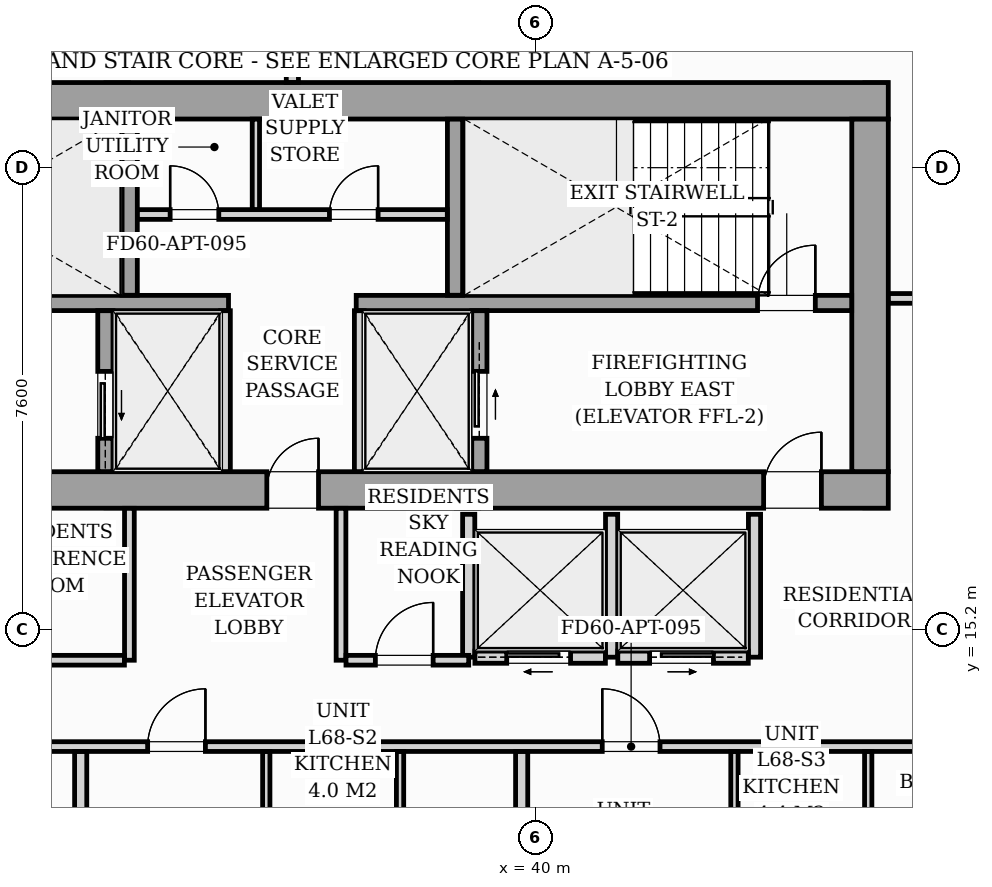
"""IFC4 building model, lengths in metres.
Left out: names, types, materials, properties, quantities, classifications, styles, units other than length and angle.
Written with IfcOpenShell. Run it as: python <this file> out.ifc"""

import sys

from ifc_helpers import new_model, si_unit, direction, frame, frame_2d, origin, origin_2d, place, context, subcontext, project, spatial, rectangle, i_section, extrude, source, transform, mapped, element, fill, save


model = new_model("IFC4")
c1 = context("Model", 3, precision=1e-05, world=origin(), true_north=direction((0.0, 1.0)))
c2 = subcontext(c1, "Body", "Model", "MODEL_VIEW")
j1 = project(units=[si_unit("LENGTHUNIT", "METRE"), si_unit("PLANEANGLEUNIT", "RADIAN")], contexts=[c1])
p1 = place(None, origin())
s1 = spatial("IfcSite", under=j1, at=p1, CompositionType="ELEMENT")
p2 = place(p1, origin())
s2 = spatial("IfcBuilding", under=s1, at=p2, CompositionType="ELEMENT")
p3 = place(p2, frame((0.0, 0.0, 236.4)))
s3 = spatial("IfcBuildingStorey", under=s2, at=p3, CompositionType="ELEMENT", Elevation=236.4)
m1 = source(origin(), c2, "Body", "SweptSolid", [
    extrude(i_section(OverallWidth=0.409, OverallDepth=0.425, WebThickness=0.033, FlangeThickness=0.052, FilletRadius=0.018, at=origin_2d()), origin(), (0.0, 0.0, 1.0), 3.296),
])
for number, where, z_axis, x_axis in (
    (1, (33.12, 17.4, 0.002), (0.0, 0.0, 1.0), (1.0, 0.0, 0.0)),
    (2, (38.88, 17.4, 0.002), (0.0, 0.0, 1.0), (1.0, 0.0, 0.0)),
    (3, (45.6, 17.4, 0.002), (0.0, 0.0, 1.0), (1.0, 0.0, 0.0)),
    (4, (33.12, 24.0, 0.002), (0.0, 0.0, 1.0), (1.0, 0.0, 0.0)),
    (5, (38.88, 24.0, 0.002), (0.0, 0.0, 1.0), (1.0, 0.0, 0.0)),
    (6, (45.6, 24.0, 0.002), (0.0, 0.0, 1.0), (1.0, 0.0, 0.0)),
):
    element("IfcColumn", number, at=place(p3, frame(where, z_axis=z_axis, x_axis=x_axis)), inside=s3, PredefinedType="PILASTER", context=c2, shape_type="MappedRepresentation", body=[
        mapped(m1, transform((0.0, 0.0, 0.0), scale=1.0)),
    ])
p4 = place(p3, frame((26.2, 17.5, 0.0), z_axis=(0.0, 0.0, 1.0), x_axis=(1.0, 0.0, 0.0)))
e7 = element("IfcWall", 7, at=p4, inside=s3, PredefinedType="SHEAR", context=c2, shape_type="SweptSolid", body=[
    extrude(rectangle(XDim=19.6, YDim=0.6, at=frame_2d((9.8, 0.0))), origin(), (0.0, 0.0, 1.0), 3.3),
])
p5 = place(p4, frame((0.95, 0.0, 0.0)))
e8 = element("IfcOpeningElement", 8, at=p5, cuts=e7, PredefinedType="OPENING", context=c2, shape_type="SweptSolid", body=[
    extrude(rectangle(XDim=0.95, YDim=2.06, at=frame_2d((0.475, 1.03))), frame((0.0, 0.31, 0.0), z_axis=(0.0, -1.0, 0.0), x_axis=(1.0, 0.0, 0.0)), (0.0, 0.0, 1.0), 0.62),
])
p6 = place(p4, frame((9.38, 0.0, 0.0)))
e9 = element("IfcOpeningElement", 9, at=p6, cuts=e7, PredefinedType="OPENING", context=c2, shape_type="SweptSolid", body=[
    extrude(rectangle(XDim=0.85, YDim=2.0, at=frame_2d((0.425, 1.0))), frame((0.0, 0.31, 0.0), z_axis=(0.0, -1.0, 0.0), x_axis=(1.0, 0.0, 0.0)), (0.0, 0.0, 1.0), 0.62),
])
p7 = place(p4, frame((17.55, 0.0, 0.0)))
e10 = element("IfcOpeningElement", 10, at=p7, cuts=e7, PredefinedType="OPENING", context=c2, shape_type="SweptSolid", body=[
    extrude(rectangle(XDim=0.95, YDim=2.06, at=frame_2d((0.475, 1.03))), frame((0.0, 0.31, 0.0), z_axis=(0.0, -1.0, 0.0), x_axis=(1.0, 0.0, 0.0)), (0.0, 0.0, 1.0), 0.62),
])
p8 = place(p3, frame((26.2, 23.9, 0.0), z_axis=(0.0, 0.0, 1.0), x_axis=(1.0, 0.0, 0.0)))
e11 = element("IfcWall", 11, at=p8, inside=s3, PredefinedType="SHEAR", context=c2, shape_type="SweptSolid", body=[
    extrude(rectangle(XDim=19.6, YDim=0.6, at=frame_2d((9.8, 0.0))), origin(), (0.0, 0.0, 1.0), 3.3),
])
p9 = place(p3, frame((45.5, 17.802, 0.0), z_axis=(0.0, 0.0, 1.0), x_axis=(0.0, 1.0, 0.0)))
e12 = element("IfcWall", 12, at=p9, inside=s3, PredefinedType="SHEAR", context=c2, shape_type="SweptSolid", body=[
    extrude(rectangle(XDim=5.796, YDim=0.6, at=frame_2d((2.898, 0.0))), origin(), (0.0, 0.0, 1.0), 3.3),
])
p10 = place(p3, frame((26.802, 20.575, 0.0), z_axis=(0.0, 0.0, 1.0), x_axis=(1.0, 0.0, 0.0)))
e13 = element("IfcWall", 13, at=p10, inside=s3, PredefinedType="SOLIDWALL", context=c2, shape_type="SweptSolid", body=[
    extrude(rectangle(XDim=8.148, YDim=0.25, at=frame_2d((4.074, 0.0))), origin(), (0.0, 0.0, 1.0), 3.3),
])
p11 = place(p10, frame((0.298, 0.0, 0.0)))
e14 = element("IfcOpeningElement", 14, at=p11, cuts=e13, PredefinedType="OPENING", context=c2, shape_type="SweptSolid", body=[
    extrude(rectangle(XDim=0.95, YDim=2.06, at=frame_2d((0.475, 1.03))), frame((0.0, 0.135, 0.0), z_axis=(0.0, -1.0, 0.0), x_axis=(1.0, 0.0, 0.0)), (0.0, 0.0, 1.0), 0.27),
])
p12 = place(p3, frame((37.05, 20.575, 0.0), z_axis=(0.0, 0.0, 1.0), x_axis=(1.0, 0.0, 0.0)))
e15 = element("IfcWall", 15, at=p12, inside=s3, PredefinedType="SOLIDWALL", context=c2, shape_type="SweptSolid", body=[
    extrude(rectangle(XDim=8.148, YDim=0.25, at=frame_2d((4.074, 0.0))), origin(), (0.0, 0.0, 1.0), 3.3),
])
p13 = place(p12, frame((6.6, 0.0, 0.0)))
e16 = element("IfcOpeningElement", 16, at=p13, cuts=e15, PredefinedType="OPENING", context=c2, shape_type="SweptSolid", body=[
    extrude(rectangle(XDim=0.95, YDim=2.06, at=frame_2d((0.475, 1.03))), frame((0.0, 0.135, 0.0), z_axis=(0.0, -1.0, 0.0), x_axis=(1.0, 0.0, 0.0)), (0.0, 0.0, 1.0), 0.27),
])
for number, where, z_axis, x_axis in (
    (17, (33.325, 20.702, 0.0), (0.0, 0.0, 1.0), (0.0, 1.0, 0.0)),
    (18, (38.675, 20.702, 0.0), (0.0, 0.0, 1.0), (0.0, 1.0, 0.0)),
):
    element("IfcWall", number, at=place(p3, frame(where, z_axis=z_axis, x_axis=x_axis)), inside=s3, PredefinedType="SOLIDWALL", context=c2, shape_type="SweptSolid", body=[
        extrude(rectangle(XDim=2.896, YDim=0.25, at=frame_2d((1.448, 0.0))), origin(), (0.0, 0.0, 1.0), 3.3),
    ])
p14 = place(p3, frame((32.925, 17.802, 0.0), z_axis=(0.0, 0.0, 1.0), x_axis=(0.0, 1.0, 0.0)))
e19 = element("IfcWall", 19, at=p14, inside=s3, PredefinedType="SOLIDWALL", context=c2, shape_type="SweptSolid", body=[
    extrude(rectangle(XDim=2.646, YDim=0.25, at=frame_2d((1.323, 0.0))), origin(), (0.0, 0.0, 1.0), 3.3),
])
p15 = place(p14, frame((0.548, 0.0, 0.0)))
e20 = element("IfcOpeningElement", 20, at=p15, cuts=e19, PredefinedType="OPENING", context=c2, shape_type="SweptSolid", body=[
    extrude(rectangle(XDim=1.1, YDim=2.08, at=frame_2d((0.55, 1.04))), frame((0.0, 0.135, 0.0), z_axis=(0.0, -1.0, 0.0), x_axis=(1.0, 0.0, 0.0)), (0.0, 0.0, 1.0), 0.27),
])
for number, where, z_axis, x_axis in (
    (21, (34.9, 17.802, 0.0), (0.0, 0.0, 1.0), (0.0, 1.0, 0.0)),
    (22, (37.1, 17.802, 0.0), (0.0, 0.0, 1.0), (0.0, 1.0, 0.0)),
):
    element("IfcWall", number, at=place(p3, frame(where, z_axis=z_axis, x_axis=x_axis)), inside=s3, PredefinedType="PARTITIONING", context=c2, shape_type="SweptSolid", body=[
        extrude(rectangle(XDim=2.646, YDim=0.16, at=frame_2d((1.323, 0.0))), origin(), (0.0, 0.0, 1.0), 3.04),
    ])
p16 = place(p3, frame((39.075, 17.802, 0.0), z_axis=(0.0, 0.0, 1.0), x_axis=(0.0, 1.0, 0.0)))
e23 = element("IfcWall", 23, at=p16, inside=s3, PredefinedType="SOLIDWALL", context=c2, shape_type="SweptSolid", body=[
    extrude(rectangle(XDim=2.646, YDim=0.25, at=frame_2d((1.323, 0.0))), origin(), (0.0, 0.0, 1.0), 3.3),
])
p17 = place(p16, frame((0.548, 0.0, 0.0)))
e24 = element("IfcOpeningElement", 24, at=p17, cuts=e23, PredefinedType="OPENING", context=c2, shape_type="SweptSolid", body=[
    extrude(rectangle(XDim=1.1, YDim=2.08, at=frame_2d((0.55, 1.04))), frame((0.0, 0.135, 0.0), z_axis=(0.0, -1.0, 0.0), x_axis=(1.0, 0.0, 0.0)), (0.0, 0.0, 1.0), 0.27),
])
p18 = place(p3, frame((33.452, 22.03, 0.0), z_axis=(0.0, 0.0, 1.0), x_axis=(1.0, 0.0, 0.0)))
e25 = element("IfcWall", 25, at=p18, inside=s3, PredefinedType="PARTITIONING", context=c2, shape_type="SweptSolid", body=[
    extrude(rectangle(XDim=5.096, YDim=0.16, at=frame_2d((2.548, 0.0))), origin(), (0.0, 0.0, 1.0), 3.04),
])
p19 = place(p18, frame((0.538, 0.0, 0.0)))
e26 = element("IfcOpeningElement", 26, at=p19, cuts=e25, PredefinedType="OPENING", context=c2, shape_type="SweptSolid", body=[
    extrude(rectangle(XDim=0.8, YDim=2.05, at=frame_2d((0.4, 1.025))), frame((0.0, 0.09, 0.0), z_axis=(0.0, -1.0, 0.0), x_axis=(1.0, 0.0, 0.0)), (0.0, 0.0, 1.0), 0.18),
])
p20 = place(p18, frame((3.158, 0.0, 0.0)))
e27 = element("IfcOpeningElement", 27, at=p20, cuts=e25, PredefinedType="OPENING", context=c2, shape_type="SweptSolid", body=[
    extrude(rectangle(XDim=0.8, YDim=2.05, at=frame_2d((0.4, 1.025))), frame((0.0, 0.09, 0.0), z_axis=(0.0, -1.0, 0.0), x_axis=(1.0, 0.0, 0.0)), (0.0, 0.0, 1.0), 0.18),
])
p21 = place(p3, frame((35.4, 22.112, 0.0), z_axis=(0.0, 0.0, 1.0), x_axis=(0.0, 1.0, 0.0)))
e28 = element("IfcWall", 28, at=p21, inside=s3, PredefinedType="PARTITIONING", context=c2, shape_type="SweptSolid", body=[
    extrude(rectangle(XDim=1.486, YDim=0.12, at=frame_2d((0.743, 0.0))), origin(), (0.0, 0.0, 1.0), 3.04),
])
for number, where, z_axis, x_axis in (
    (29, (38.9, 14.75, 0.0), (0.0, 0.0, 1.0), (0.0, 1.0, 0.0)),
    (30, (41.25, 14.75, 0.0), (0.0, 0.0, 1.0), (0.0, 1.0, 0.0)),
    (31, (43.6, 14.75, 0.0), (0.0, 0.0, 1.0), (0.0, 1.0, 0.0)),
):
    element("IfcWall", number, at=place(p3, frame(where, z_axis=z_axis, x_axis=x_axis)), inside=s3, PredefinedType="PARTITIONING", context=c2, shape_type="SweptSolid", body=[
        extrude(rectangle(XDim=2.35, YDim=0.2, at=frame_2d((1.175, 0.0))), origin(), (0.0, 0.0, 1.0), 3.04),
    ])
p22 = place(p3, frame((39.002, 14.75, 0.0), z_axis=(0.0, 0.0, 1.0), x_axis=(1.0, 0.0, 0.0)))
e32 = element("IfcWall", 32, at=p22, inside=s3, PredefinedType="PARTITIONING", context=c2, shape_type="SweptSolid", body=[
    extrude(rectangle(XDim=2.146, YDim=0.2, at=frame_2d((1.073, 0.0))), origin(), (0.0, 0.0, 1.0), 3.04),
])
p23 = place(p22, frame((0.523, 0.0, 0.0)))
e33 = element("IfcOpeningElement", 33, at=p23, cuts=e32, PredefinedType="OPENING", context=c2, shape_type="SweptSolid", body=[
    extrude(rectangle(XDim=1.05, YDim=2.08, at=frame_2d((0.525, 1.04))), frame((0.0, 0.11, 0.0), z_axis=(0.0, -1.0, 0.0), x_axis=(1.0, 0.0, 0.0)), (0.0, 0.0, 1.0), 0.22),
])
p24 = place(p3, frame((41.352, 14.75, 0.0), z_axis=(0.0, 0.0, 1.0), x_axis=(1.0, 0.0, 0.0)))
e34 = element("IfcWall", 34, at=p24, inside=s3, PredefinedType="PARTITIONING", context=c2, shape_type="SweptSolid", body=[
    extrude(rectangle(XDim=2.146, YDim=0.2, at=frame_2d((1.073, 0.0))), origin(), (0.0, 0.0, 1.0), 3.04),
])
p25 = place(p24, frame((0.523, 0.0, 0.0)))
e35 = element("IfcOpeningElement", 35, at=p25, cuts=e34, PredefinedType="OPENING", context=c2, shape_type="SweptSolid", body=[
    extrude(rectangle(XDim=1.05, YDim=2.08, at=frame_2d((0.525, 1.04))), frame((0.0, 0.11, 0.0), z_axis=(0.0, -1.0, 0.0), x_axis=(1.0, 0.0, 0.0)), (0.0, 0.0, 1.0), 0.22),
])
p26 = place(p3, frame((26.12, 13.28, 0.0), z_axis=(0.0, 0.0, 1.0), x_axis=(1.0, 0.0, 0.0)))
e36 = element("IfcWall", 36, at=p26, inside=s3, PredefinedType="PARTITIONING", context=c2, shape_type="SweptSolid", body=[
    extrude(rectangle(XDim=21.33, YDim=0.16, at=frame_2d((10.665, 0.0))), origin(), (0.0, 0.0, 1.0), 2.597),
])
p27 = place(p26, frame((4.704, 0.0, 0.0)))
e37 = element("IfcOpeningElement", 37, at=p27, cuts=e36, PredefinedType="OPENING", context=c2, shape_type="SweptSolid", body=[
    extrude(rectangle(XDim=0.95, YDim=2.06, at=frame_2d((0.475, 1.03))), frame((0.0, 0.09, 0.0), z_axis=(0.0, -1.0, 0.0), x_axis=(1.0, 0.0, 0.0)), (0.0, 0.0, 1.0), 0.18),
])
p28 = place(p26, frame((7.5, 0.0, 0.0)))
e38 = element("IfcOpeningElement", 38, at=p28, cuts=e36, PredefinedType="OPENING", context=c2, shape_type="SweptSolid", body=[
    extrude(rectangle(XDim=0.95, YDim=2.06, at=frame_2d((0.475, 1.03))), frame((0.0, 0.09, 0.0), z_axis=(0.0, -1.0, 0.0), x_axis=(1.0, 0.0, 0.0)), (0.0, 0.0, 1.0), 0.18),
])
p29 = place(p26, frame((14.976, 0.0, 0.0)))
e39 = element("IfcOpeningElement", 39, at=p29, cuts=e36, PredefinedType="OPENING", context=c2, shape_type="SweptSolid", body=[
    extrude(rectangle(XDim=0.95, YDim=2.06, at=frame_2d((0.475, 1.03))), frame((0.0, 0.09, 0.0), z_axis=(0.0, -1.0, 0.0), x_axis=(1.0, 0.0, 0.0)), (0.0, 0.0, 1.0), 0.18),
])
p30 = place(p3, frame((36.0, 24.202, 0.0), z_axis=(0.0, 0.0, 1.0), x_axis=(0.0, 1.0, 0.0)))
e40 = element("IfcWall", 40, at=p30, inside=s3, PredefinedType="PARTITIONING", context=c2, shape_type="SweptSolid", body=[
    extrude(rectangle(XDim=2.363, YDim=0.2, at=frame_2d((1.182, 0.0))), origin(), (0.0, 0.0, 1.0), 3.04),
])
p31 = place(p3, frame((45.802, 20.65, 0.0), z_axis=(0.0, 0.0, 1.0), x_axis=(1.0, 0.0, 0.0)))
e41 = element("IfcWall", 41, at=p31, inside=s3, PredefinedType="PARTITIONING", context=c2, shape_type="SweptSolid", body=[
    extrude(rectangle(XDim=1.566, YDim=0.16, at=frame_2d((0.783, 0.0))), origin(), (0.0, 0.0, 1.0), 3.04),
])
p32 = place(p3, frame((32.519, 9.169, 0.0), z_axis=(0.0, 0.0, 1.0), x_axis=(0.0, 1.0, 0.0)))
e42 = element("IfcWall", 42, at=p32, inside=s3, PredefinedType="PARTITIONING", context=c2, shape_type="SweptSolid", body=[
    extrude(rectangle(XDim=4.029, YDim=0.2, at=frame_2d((2.014, 0.0))), origin(), (0.0, 0.0, 1.0), 2.4),
])
for number, where, z_axis, x_axis in (
    (43, (35.571, 11.273, 0.0), (0.0, 0.0, 1.0), (0.0, 1.0, 0.0)),
    (44, (37.771, 11.273, 0.0), (0.0, 0.0, 1.0), (0.0, 1.0, 0.0)),
):
    element("IfcWall", number, at=place(p3, frame(where, z_axis=z_axis, x_axis=x_axis)), inside=s3, PredefinedType="PARTITIONING", context=c2, shape_type="SweptSolid", body=[
        extrude(rectangle(XDim=1.925, YDim=0.12, at=frame_2d((0.962, 0.0))), origin(), (0.0, 0.0, 1.0), 3.04),
    ])
p33 = place(p3, frame((39.771, 11.273, 0.0), z_axis=(0.0, 0.0, 1.0), x_axis=(0.0, 1.0, 0.0)))
e45 = element("IfcWall", 45, at=p33, inside=s3, PredefinedType="PARTITIONING", context=c2, shape_type="SweptSolid", body=[
    extrude(rectangle(XDim=1.925, YDim=0.2, at=frame_2d((0.962, 0.0))), origin(), (0.0, 0.0, 1.0), 3.04),
])
for number, where, z_axis, x_axis in (
    (46, (43.27, 11.092, 0.0), (0.0, 0.0, 1.0), (0.0, 1.0, 0.0)),
    (47, (45.47, 11.092, 0.0), (0.0, 0.0, 1.0), (0.0, 1.0, 0.0)),
):
    element("IfcWall", number, at=place(p3, frame(where, z_axis=z_axis, x_axis=x_axis)), inside=s3, PredefinedType="PARTITIONING", context=c2, shape_type="SweptSolid", body=[
        extrude(rectangle(XDim=2.106, YDim=0.12, at=frame_2d((1.053, 0.0))), origin(), (0.0, 0.0, 1.0), 3.04),
    ])
p34 = place(p3, frame((33.32, 14.7, 0.0), z_axis=(0.0, 0.0, 1.0), x_axis=(0.0, 1.0, 0.0)))
e48 = element("IfcWall", 48, at=p34, inside=s3, PredefinedType="PARTITIONING", context=c2, shape_type="SweptSolid", body=[
    extrude(rectangle(XDim=2.498, YDim=0.16, at=frame_2d((1.249, 0.0))), origin(), (0.0, 0.0, 1.0), 3.04),
])
p35 = place(p3, frame((28.442, 14.7, 0.0), z_axis=(0.0, 0.0, 1.0), x_axis=(1.0, 0.0, 0.0)))
e49 = element("IfcWall", 49, at=p35, inside=s3, PredefinedType="PARTITIONING", context=c2, shape_type="SweptSolid", body=[
    extrude(rectangle(XDim=4.796, YDim=0.16, at=frame_2d((2.398, 0.0))), origin(), (0.0, 0.0, 1.0), 2.597),
])
p36 = place(p35, frame((1.923, 0.0, 0.0)))
e50 = element("IfcOpeningElement", 50, at=p36, cuts=e49, PredefinedType="OPENING", context=c2, shape_type="SweptSolid", body=[
    extrude(rectangle(XDim=0.95, YDim=2.06, at=frame_2d((0.475, 1.03))), frame((0.0, 0.09, 0.0), z_axis=(0.0, -1.0, 0.0), x_axis=(1.0, 0.0, 0.0)), (0.0, 0.0, 1.0), 0.18),
])
p37 = place(p3, frame((36.8, 14.7, 0.0), z_axis=(0.0, 0.0, 1.0), x_axis=(0.0, 1.0, 0.0)))
e51 = element("IfcWall", 51, at=p37, inside=s3, PredefinedType="PARTITIONING", context=c2, shape_type="SweptSolid", body=[
    extrude(rectangle(XDim=2.498, YDim=0.16, at=frame_2d((1.249, 0.0))), origin(), (0.0, 0.0, 1.0), 3.04),
])
p38 = place(p3, frame((36.882, 14.7, 0.0), z_axis=(0.0, 0.0, 1.0), x_axis=(1.0, 0.0, 0.0)))
e52 = element("IfcWall", 52, at=p38, inside=s3, PredefinedType="PARTITIONING", context=c2, shape_type="SweptSolid", body=[
    extrude(rectangle(XDim=2.018, YDim=0.16, at=frame_2d((1.009, 0.0))), origin(), (0.0, 0.0, 1.0), 3.04),
])
p39 = place(p38, frame((0.483, 0.0, 0.0)))
e53 = element("IfcOpeningElement", 53, at=p39, cuts=e52, PredefinedType="OPENING", context=c2, shape_type="SweptSolid", body=[
    extrude(rectangle(XDim=0.95, YDim=2.06, at=frame_2d((0.475, 1.03))), frame((0.0, 0.09, 0.0), z_axis=(0.0, -1.0, 0.0), x_axis=(1.0, 0.0, 0.0)), (0.0, 0.0, 1.0), 0.18),
])
m2 = source(origin(), c2, "Body", "SweptSolid", [
    extrude(rectangle(XDim=0.85, YDim=2.0, at=frame_2d((0.425, 1.0))), frame((0.0, 0.025, 0.0), z_axis=(0.0, -1.0, 0.0), x_axis=(1.0, 0.0, 0.0)), (0.0, 0.0, 1.0), 0.05),
])
p40 = place(p6, origin())
e54 = element("IfcDoor", 54, at=p40, inside=s3, OperationType="SINGLE_SWING_RIGHT", PredefinedType="DOOR", context=c2, shape_type="MappedRepresentation", body=[
    mapped(m2, transform((0.0, 0.0, 0.0), scale=1.0)),
])
fill(e9, e54)
m3 = source(origin(), c2, "Body", "SweptSolid", [
    extrude(rectangle(XDim=0.95, YDim=2.06, at=frame_2d((0.475, 1.03))), frame((0.0, 0.025, 0.0), z_axis=(0.0, -1.0, 0.0), x_axis=(1.0, 0.0, 0.0)), (0.0, 0.0, 1.0), 0.05),
])
p41 = place(p7, origin())
e55 = element("IfcDoor", 55, at=p41, inside=s3, OperationType="SINGLE_SWING_RIGHT", PredefinedType="DOOR", context=c2, shape_type="MappedRepresentation", body=[
    mapped(m3, transform((0.0, 0.0, 0.0), scale=1.0)),
])
fill(e10, e55)
p42 = place(p13, origin())
e56 = element("IfcDoor", 56, at=p42, inside=s3, OperationType="SINGLE_SWING_RIGHT", PredefinedType="DOOR", context=c2, shape_type="MappedRepresentation", body=[
    mapped(m3, transform((0.0, 0.0, 0.0), scale=1.0)),
])
fill(e16, e56)
m4 = source(origin(), c2, "Body", "SweptSolid", [
    extrude(rectangle(XDim=1.1, YDim=2.08, at=frame_2d((0.55, 1.04))), frame((0.0, 0.025, 0.0), z_axis=(0.0, -1.0, 0.0), x_axis=(1.0, 0.0, 0.0)), (0.0, 0.0, 1.0), 0.05),
])
p43 = place(p15, origin())
e57 = element("IfcDoor", 57, at=p43, inside=s3, OperationType="SLIDING_TO_LEFT", PredefinedType="DOOR", context=c2, shape_type="MappedRepresentation", body=[
    mapped(m4, transform((0.0, 0.0, 0.0), scale=1.0)),
])
fill(e20, e57)
p44 = place(p17, origin())
e58 = element("IfcDoor", 58, at=p44, inside=s3, OperationType="SLIDING_TO_RIGHT", PredefinedType="DOOR", context=c2, shape_type="MappedRepresentation", body=[
    mapped(m4, transform((0.0, 0.0, 0.0), scale=1.0)),
])
fill(e24, e58)
m5 = source(origin(), c2, "Body", "SweptSolid", [
    extrude(rectangle(XDim=0.8, YDim=2.05, at=frame_2d((0.4, 1.025))), frame((0.0, 0.025, 0.0), z_axis=(0.0, -1.0, 0.0), x_axis=(1.0, 0.0, 0.0)), (0.0, 0.0, 1.0), 0.05),
])
p45 = place(p19, origin())
e59 = element("IfcDoor", 59, at=p45, inside=s3, OperationType="SINGLE_SWING_LEFT", PredefinedType="DOOR", context=c2, shape_type="MappedRepresentation", body=[
    mapped(m5, transform((0.0, 0.0, 0.0), scale=1.0)),
])
fill(e26, e59)
p46 = place(p20, origin())
e60 = element("IfcDoor", 60, at=p46, inside=s3, OperationType="SINGLE_SWING_RIGHT", PredefinedType="DOOR", context=c2, shape_type="MappedRepresentation", body=[
    mapped(m5, transform((0.0, 0.0, 0.0), scale=1.0)),
])
fill(e27, e60)
m6 = source(origin(), c2, "Body", "SweptSolid", [
    extrude(rectangle(XDim=1.05, YDim=2.08, at=frame_2d((0.525, 1.04))), frame((0.0, 0.025, 0.0), z_axis=(0.0, -1.0, 0.0), x_axis=(1.0, 0.0, 0.0)), (0.0, 0.0, 1.0), 0.05),
])
p47 = place(p23, origin())
e61 = element("IfcDoor", 61, at=p47, inside=s3, OperationType="SLIDING_TO_LEFT", PredefinedType="DOOR", context=c2, shape_type="MappedRepresentation", body=[
    mapped(m6, transform((0.0, 0.0, 0.0), scale=1.0)),
])
fill(e33, e61)
p48 = place(p25, origin())
e62 = element("IfcDoor", 62, at=p48, inside=s3, OperationType="SLIDING_TO_RIGHT", PredefinedType="DOOR", context=c2, shape_type="MappedRepresentation", body=[
    mapped(m6, transform((0.0, 0.0, 0.0), scale=1.0)),
])
fill(e35, e62)
m7 = source(origin(), c2, "Body", "SweptSolid", [
    extrude(rectangle(XDim=0.95, YDim=2.06, at=frame_2d((0.475, 1.03))), frame((0.0, 0.025, 0.0), z_axis=(0.0, -1.0, 0.0), x_axis=(1.0, 0.0, 0.0)), (0.0, 0.0, 1.0), 0.05),
])
p49 = place(p28, origin())
e63 = element("IfcDoor", 63, at=p49, inside=s3, OperationType="SINGLE_SWING_RIGHT", PredefinedType="DOOR", context=c2, shape_type="MappedRepresentation", body=[
    mapped(m7, transform((0.0, 0.0, 0.0), scale=1.0)),
])
fill(e38, e63)
p50 = place(p29, origin())
e64 = element("IfcDoor", 64, at=p50, inside=s3, OperationType="SINGLE_SWING_LEFT", PredefinedType="DOOR", context=c2, shape_type="MappedRepresentation", body=[
    mapped(m7, transform((0.0, 0.0, 0.0), scale=1.0)),
])
fill(e39, e64)
p51 = place(p39, origin())
e65 = element("IfcDoor", 65, at=p51, inside=s3, OperationType="SINGLE_SWING_RIGHT", PredefinedType="DOOR", context=c2, shape_type="MappedRepresentation", body=[
    mapped(m7, transform((0.0, 0.0, 0.0), scale=1.0)),
])
fill(e53, e65)
save(model, sys.argv[1])
